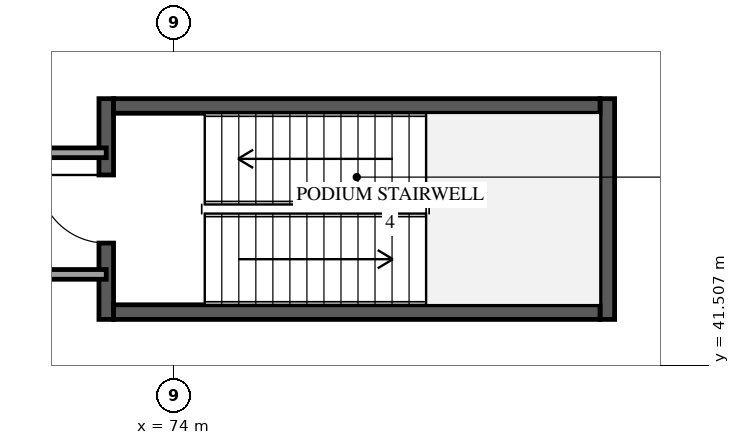
"""IFC4 building model, lengths in metres.
Left out: names, types, materials, properties, quantities, classifications, styles, units other than length and angle.
Written with IfcOpenShell. Run it as: python <this file> out.ifc"""

import sys

from ifc_helpers import new_model, si_unit, direction, frame, frame_2d, origin, place, context, subcontext, project, spatial, rectangle, extrude, element, fill, save


model = new_model("IFC4")
c1 = context("Model", 3, precision=1e-05, world=origin(), true_north=direction((0.0, 1.0)))
c2 = subcontext(c1, "Body", "Model", "MODEL_VIEW")
j1 = project(units=[si_unit("LENGTHUNIT", "METRE"), si_unit("PLANEANGLEUNIT", "RADIAN")], contexts=[c1])
p1 = place(None, origin())
s1 = spatial("IfcSite", under=j1, at=p1, CompositionType="ELEMENT")
p2 = place(p1, origin())
s2 = spatial("IfcBuilding", under=s1, at=p2, CompositionType="ELEMENT")
p3 = place(p2, frame((0.0, 0.0, -10.2)))
s3 = spatial("IfcBuildingStorey", under=s2, at=p3, CompositionType="ELEMENT", Elevation=-10.2)
p4 = place(p3, frame((72.88, 42.26, -0.4), z_axis=(0.0, 0.0, 1.0), x_axis=(0.0, 1.0, 0.0)))
e1 = element("IfcWall", 1, at=p4, inside=s3, PredefinedType="SHEAR", context=c2, shape_type="SweptSolid", body=[
    extrude(rectangle(XDim=3.63, YDim=0.24, at=frame_2d((1.815, 0.0))), origin(), (0.0, 0.0, 1.0), 5.2),
])
p5 = place(p4, frame((1.255, 0.0, 0.4)))
e2 = element("IfcOpeningElement", 2, at=p5, cuts=e1, PredefinedType="OPENING", context=c2, shape_type="SweptSolid", body=[
    extrude(rectangle(XDim=1.12, YDim=2.15, at=frame_2d((0.56, 1.075))), frame((0.0, 0.13, 0.0), z_axis=(0.0, -1.0, 0.0), x_axis=(1.0, 0.0, 0.0)), (0.0, 0.0, 1.0), 0.26),
])
p6 = place(p3, frame((81.12, 42.26, -0.4), z_axis=(0.0, 0.0, 1.0), x_axis=(0.0, 1.0, 0.0)))
e3 = element("IfcWall", 3, at=p6, inside=s3, PredefinedType="SHEAR", context=c2, shape_type="SweptSolid", body=[
    extrude(rectangle(XDim=3.63, YDim=0.24, at=frame_2d((1.815, 0.0))), origin(), (0.0, 0.0, 1.0), 5.2),
])
for number, where, z_axis, x_axis in (
    (4, (73.0, 42.38, -0.4), (0.0, 0.0, 1.0), (1.0, 0.0, 0.0)),
    (5, (73.0, 45.77, -0.4), (0.0, 0.0, 1.0), (1.0, 0.0, 0.0)),
):
    element("IfcWall", number, at=place(p3, frame(where, z_axis=z_axis, x_axis=x_axis)), inside=s3, PredefinedType="SHEAR", context=c2, shape_type="SweptSolid", body=[
        extrude(rectangle(XDim=8.0, YDim=0.24, at=frame_2d((4.0, 0.0))), origin(), (0.0, 0.0, 1.0), 5.2),
    ])
p7 = place(p3, frame((44.87, 45.0, 0.0), z_axis=(0.0, 0.0, 1.0), x_axis=(1.0, 0.0, 0.0)))
e6 = element("IfcWall", 6, at=p7, inside=s3, PredefinedType="PARTITIONING", context=c2, shape_type="SweptSolid", body=[
    extrude(rectangle(XDim=28.01, YDim=0.16, at=frame_2d((14.005, 0.0))), origin(), (0.0, 0.0, 1.0), 4.44),
])
p8 = place(p7, frame((13.53, 0.0, 0.0)))
e7 = element("IfcOpeningElement", 7, at=p8, cuts=e6, PredefinedType="OPENING", context=c2, shape_type="SweptSolid", body=[
    extrude(rectangle(XDim=0.95, YDim=2.15, at=frame_2d((0.475, 1.075))), frame((0.0, 0.09, 0.0), z_axis=(0.0, -1.0, 0.0), x_axis=(1.0, 0.0, 0.0)), (0.0, 0.0, 1.0), 0.18),
])
p9 = place(p3, frame((72.88, 43.0, 0.0), z_axis=(0.0, 0.0, 1.0), x_axis=(-1.0, 0.0, 0.0)))
e8 = element("IfcWall", 8, at=p9, inside=s3, PredefinedType="PARTITIONING", context=c2, shape_type="SweptSolid", body=[
    extrude(rectangle(XDim=26.01, YDim=0.16, at=frame_2d((13.005, 0.0))), origin(), (0.0, 0.0, 1.0), 4.44),
])
p10 = place(p5, origin())
e9 = element("IfcDoor", 9, at=p10, inside=s3, OperationType="SINGLE_SWING_RIGHT", PredefinedType="DOOR", context=c2, shape_type="SweptSolid", body=[
    extrude(rectangle(XDim=1.12, YDim=2.15, at=frame_2d((0.56, 1.075))), frame((0.0, 0.025, 0.0), z_axis=(0.0, -1.0, 0.0), x_axis=(1.0, 0.0, 0.0)), (0.0, 0.0, 1.0), 0.05),
])
fill(e2, e9)
save(model, sys.argv[1])
